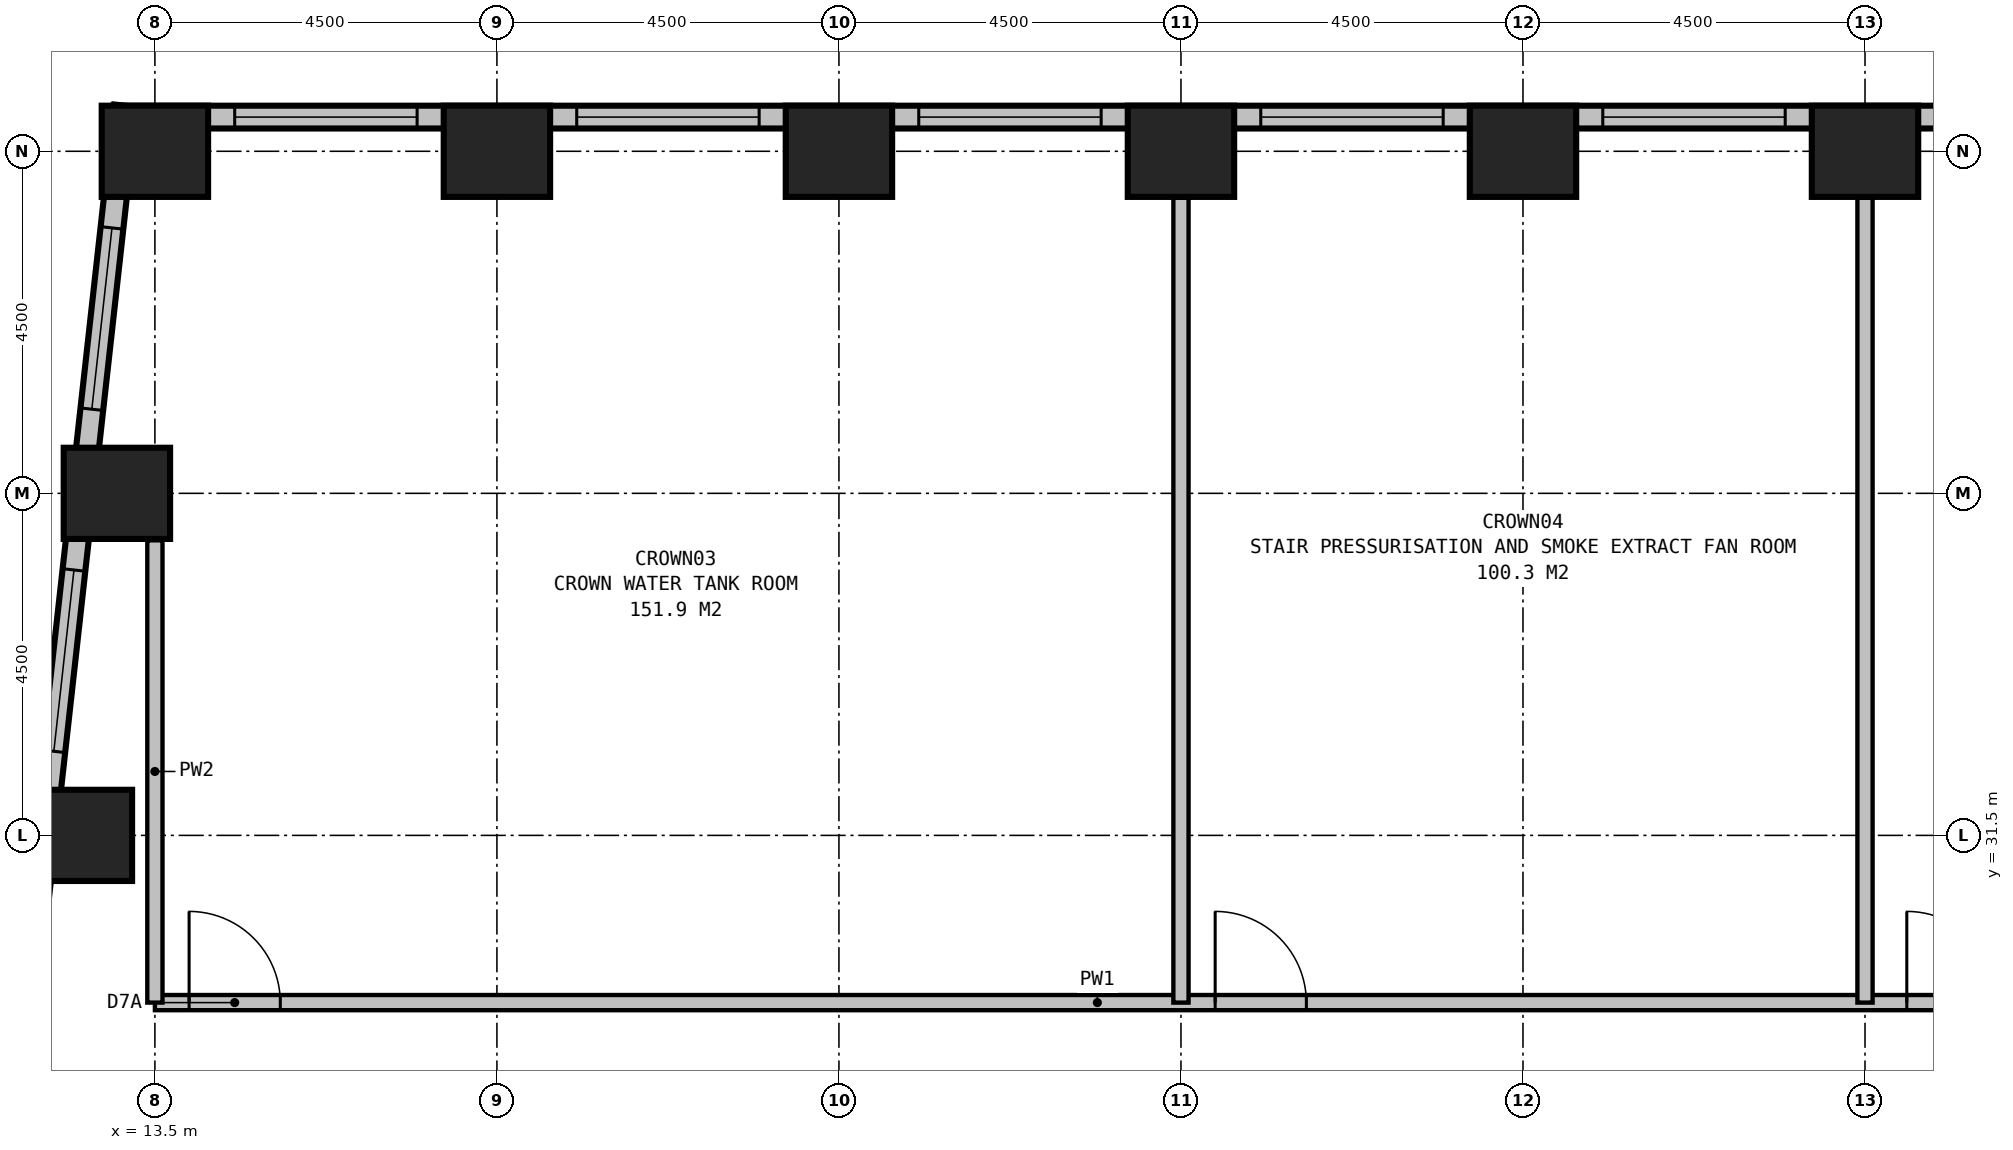
"""IFC4 building model, lengths in metres.
Left out: names, types, materials, properties, quantities, classifications, styles, units other than length and angle.
Written with IfcOpenShell. Run it as: python <this file> out.ifc"""

import sys

from ifc_helpers import new_model, si_unit, direction, frame, frame_2d, origin, origin_2d, place, context, subcontext, project, spatial, polyline, rectangle, outline, extrude, clip, halfspace, element, fill, save


model = new_model("IFC4")
c1 = context("Model", 3, precision=1e-05, world=origin(), true_north=direction((0.0, 1.0)))
c2 = subcontext(c1, "Body", "Model", "MODEL_VIEW")
j1 = project(units=[si_unit("LENGTHUNIT", "METRE"), si_unit("PLANEANGLEUNIT", "RADIAN")], contexts=[c1])
p1 = place(None, origin())
s1 = spatial("IfcSite", under=j1, at=p1, CompositionType="ELEMENT")
p2 = place(p1, origin())
s2 = spatial("IfcBuilding", under=s1, at=p2, CompositionType="ELEMENT")
p3 = place(p2, frame((0.0, 0.0, 289.7)))
s3 = spatial("IfcBuildingStorey", under=s2, at=p3, CompositionType="ELEMENT", Elevation=289.7)
p4 = place(p3, frame((36.0, 40.5, 0.0), z_axis=(0.0, 0.0, 1.0), x_axis=(1.0, 0.0, 0.0)))
e1 = element("IfcColumn", 1, at=p4, inside=s3, PredefinedType="COLUMN", context=c2, shape_type="Clipping", body=[
    clip(extrude(rectangle(XDim=1.4, YDim=1.2, at=origin_2d()), origin(), (0.0, 0.0, 1.0), 20.243), halfspace(frame((0.0, 0.0, 20.291), z_axis=(-0.294483896091, -0.25767390908, 0.920262675285), x_axis=(0.952424195267, 0.0, 0.304775576894)), False)),
])
p5 = place(p3, frame((31.5, 40.5, 0.0), z_axis=(0.0, 0.0, 1.0), x_axis=(1.0, 0.0, 0.0)))
e2 = element("IfcColumn", 2, at=p5, inside=s3, PredefinedType="COLUMN", context=c2, shape_type="Clipping", body=[
    clip(extrude(rectangle(XDim=1.4, YDim=1.2, at=origin_2d()), origin(), (0.0, 0.0, 1.0), 18.803), halfspace(frame((0.0, 0.0, 18.851), z_axis=(-0.294483896091, -0.25767390908, 0.920262675285), x_axis=(0.952424195267, 0.0, 0.304775576894)), False)),
])
p6 = place(p3, frame((27.0, 40.5, 0.0), z_axis=(0.0, 0.0, 1.0), x_axis=(1.0, 0.0, 0.0)))
e3 = element("IfcColumn", 3, at=p6, inside=s3, PredefinedType="COLUMN", context=c2, shape_type="Clipping", body=[
    clip(extrude(rectangle(XDim=1.4, YDim=1.2, at=origin_2d()), origin(), (0.0, 0.0, 1.0), 17.363), halfspace(frame((0.0, 0.0, 17.411), z_axis=(-0.294483896091, -0.25767390908, 0.920262675285), x_axis=(0.952424195267, 0.0, 0.304775576894)), False)),
])
p7 = place(p3, frame((22.5, 40.5, 0.0), z_axis=(0.0, 0.0, 1.0), x_axis=(1.0, 0.0, 0.0)))
e4 = element("IfcColumn", 4, at=p7, inside=s3, PredefinedType="COLUMN", context=c2, shape_type="Clipping", body=[
    clip(extrude(rectangle(XDim=1.4, YDim=1.2, at=origin_2d()), origin(), (0.0, 0.0, 1.0), 15.923), halfspace(frame((0.0, 0.0, 15.971), z_axis=(-0.294483896091, -0.25767390908, 0.920262675285), x_axis=(0.952424195267, 0.0, 0.304775576894)), False)),
])
p8 = place(p3, frame((18.0, 40.5, 0.0), z_axis=(0.0, 0.0, 1.0), x_axis=(1.0, 0.0, 0.0)))
e5 = element("IfcColumn", 5, at=p8, inside=s3, PredefinedType="COLUMN", context=c2, shape_type="Clipping", body=[
    clip(extrude(rectangle(XDim=1.4, YDim=1.2, at=origin_2d()), origin(), (0.0, 0.0, 1.0), 14.483), halfspace(frame((0.0, 0.0, 14.531), z_axis=(-0.294483896091, -0.25767390908, 0.920262675285), x_axis=(0.952424195267, 0.0, 0.304775576894)), False)),
])
p9 = place(p3, frame((13.5, 40.5, 0.0), z_axis=(0.0, 0.0, 1.0), x_axis=(1.0, 0.0, 0.0)))
e6 = element("IfcColumn", 6, at=p9, inside=s3, PredefinedType="COLUMN", context=c2, shape_type="Clipping", body=[
    clip(extrude(rectangle(XDim=1.4, YDim=1.2, at=origin_2d()), origin(), (0.0, 0.0, 1.0), 13.043), halfspace(frame((0.0, 0.0, 13.091), z_axis=(-0.294483896091, -0.25767390908, 0.920262675285), x_axis=(0.952424195267, 0.0, 0.304775576894)), False)),
])
p10 = place(p3, frame((13.0, 36.0, 0.0), z_axis=(0.0, 0.0, 1.0), x_axis=(1.0, 0.0, 0.0)))
e7 = element("IfcColumn", 7, at=p10, inside=s3, PredefinedType="COLUMN", context=c2, shape_type="Clipping", body=[
    clip(extrude(rectangle(XDim=1.4, YDim=1.2, at=origin_2d()), origin(), (0.0, 0.0, 1.0), 11.623), halfspace(frame((0.0, 0.0, 11.671), z_axis=(-0.294483896091, -0.25767390908, 0.920262675285), x_axis=(0.952424195267, 0.0, 0.304775576894)), False)),
])
p11 = place(p3, frame((12.5, 31.5, 0.0), z_axis=(0.0, 0.0, 1.0), x_axis=(1.0, 0.0, 0.0)))
e8 = element("IfcColumn", 8, at=p11, inside=s3, PredefinedType="COLUMN", context=c2, shape_type="Clipping", body=[
    clip(extrude(rectangle(XDim=1.4, YDim=1.2, at=origin_2d()), origin(), (0.0, 0.0, 1.0), 10.203), halfspace(frame((0.0, 0.0, 10.251), z_axis=(-0.294483896091, -0.25767390908, 0.920262675285), x_axis=(0.952424195267, 0.0, 0.304775576894)), False)),
])
p12 = place(p3, frame((41.1, 40.95, -0.3), z_axis=(0.0, 0.0, 1.0), x_axis=(-1.0, 0.0, 0.0)))
e9 = element("IfcWall", 9, at=p12, inside=s3, PredefinedType="STANDARD", context=c2, shape_type="Clipping", body=[
    clip(extrude(outline(polyline([(0.0, 0.0), (28.153, 0.0), (28.153, 13.34), (0.0, 22.349), (0.0, 0.0)])), frame((0.0, 0.15, 0.0), z_axis=(0.0, -1.0, 0.0), x_axis=(1.0, 0.0, 0.0)), (0.0, 0.0, 1.0), 0.3), halfspace(frame((0.0, 0.0, 22.349), z_axis=(0.294483896091, 0.25767390908, 0.920262675285), x_axis=(0.952424195267, 0.0, -0.304775576894)), False)),
])
p13 = place(p12, frame((1.65, 0.0, 0.8)))
e10 = element("IfcOpeningElement", 10, at=p13, cuts=e9, PredefinedType="OPENING", context=c2, shape_type="SweptSolid", body=[
    extrude(rectangle(XDim=2.4, YDim=1.8, at=frame_2d((1.2, 0.9))), frame((0.0, 0.16, 0.0), z_axis=(0.0, -1.0, 0.0), x_axis=(1.0, 0.0, 0.0)), (0.0, 0.0, 1.0), 0.32),
])
p14 = place(p12, frame((6.15, 0.0, 0.8)))
e11 = element("IfcOpeningElement", 11, at=p14, cuts=e9, PredefinedType="OPENING", context=c2, shape_type="SweptSolid", body=[
    extrude(rectangle(XDim=2.4, YDim=1.8, at=frame_2d((1.2, 0.9))), frame((0.0, 0.16, 0.0), z_axis=(0.0, -1.0, 0.0), x_axis=(1.0, 0.0, 0.0)), (0.0, 0.0, 1.0), 0.32),
])
p15 = place(p12, frame((10.65, 0.0, 0.8)))
e12 = element("IfcOpeningElement", 12, at=p15, cuts=e9, PredefinedType="OPENING", context=c2, shape_type="SweptSolid", body=[
    extrude(rectangle(XDim=2.4, YDim=1.8, at=frame_2d((1.2, 0.9))), frame((0.0, 0.16, 0.0), z_axis=(0.0, -1.0, 0.0), x_axis=(1.0, 0.0, 0.0)), (0.0, 0.0, 1.0), 0.32),
])
p16 = place(p12, frame((15.15, 0.0, 0.8)))
e13 = element("IfcOpeningElement", 13, at=p16, cuts=e9, PredefinedType="OPENING", context=c2, shape_type="SweptSolid", body=[
    extrude(rectangle(XDim=2.4, YDim=1.8, at=frame_2d((1.2, 0.9))), frame((0.0, 0.16, 0.0), z_axis=(0.0, -1.0, 0.0), x_axis=(1.0, 0.0, 0.0)), (0.0, 0.0, 1.0), 0.32),
])
p17 = place(p12, frame((19.65, 0.0, 0.8)))
e14 = element("IfcOpeningElement", 14, at=p17, cuts=e9, PredefinedType="OPENING", context=c2, shape_type="SweptSolid", body=[
    extrude(rectangle(XDim=2.4, YDim=1.8, at=frame_2d((1.2, 0.9))), frame((0.0, 0.16, 0.0), z_axis=(0.0, -1.0, 0.0), x_axis=(1.0, 0.0, 0.0)), (0.0, 0.0, 1.0), 0.32),
])
p18 = place(p12, frame((24.15, 0.0, 0.8)))
e15 = element("IfcOpeningElement", 15, at=p18, cuts=e9, PredefinedType="OPENING", context=c2, shape_type="SweptSolid", body=[
    extrude(rectangle(XDim=2.4, YDim=1.8, at=frame_2d((1.2, 0.9))), frame((0.0, 0.16, 0.0), z_axis=(0.0, -1.0, 0.0), x_axis=(1.0, 0.0, 0.0)), (0.0, 0.0, 1.0), 0.32),
])
p19 = place(p3, frame((13.114, 41.099, -0.3), z_axis=(0.0, 0.0, 1.0), x_axis=(-0.110429082637, -0.993884006164, 0.0)))
e16 = element("IfcWall", 16, at=p19, inside=s3, PredefinedType="STANDARD", context=c2, shape_type="Clipping", body=[
    clip(extrude(outline(polyline([(0.0, 0.0), (32.899, 0.0), (32.899, 3.117), (0.0, 13.435), (0.0, 0.0)])), frame((0.0, 0.15, 0.0), z_axis=(0.0, -1.0, 0.0), x_axis=(1.0, 0.0, 0.0)), (0.0, 0.0, 1.0), 0.3), halfspace(frame((0.0, 0.0, 13.435), z_axis=(0.288617563537, -0.264228140999, 0.920262675285), x_axis=(0.954173815871, 0.0, -0.299252951709)), False)),
])
p20 = place(p19, frame((1.617, 0.0, 0.8)))
e17 = element("IfcOpeningElement", 17, at=p20, cuts=e16, PredefinedType="OPENING", context=c2, shape_type="SweptSolid", body=[
    extrude(rectangle(XDim=2.4, YDim=1.8, at=frame_2d((1.2, 0.9))), frame((0.0, 0.16, 0.0), z_axis=(0.0, -1.0, 0.0), x_axis=(1.0, 0.0, 0.0)), (0.0, 0.0, 1.0), 0.32),
])
p21 = place(p19, frame((6.145, 0.0, 0.8)))
e18 = element("IfcOpeningElement", 18, at=p21, cuts=e16, PredefinedType="OPENING", context=c2, shape_type="SweptSolid", body=[
    extrude(rectangle(XDim=2.4, YDim=1.8, at=frame_2d((1.2, 0.9))), frame((0.0, 0.16, 0.0), z_axis=(0.0, -1.0, 0.0), x_axis=(1.0, 0.0, 0.0)), (0.0, 0.0, 1.0), 0.32),
])
p22 = place(p19, frame((10.672, 0.0, 0.8)))
e19 = element("IfcOpeningElement", 19, at=p22, cuts=e16, PredefinedType="OPENING", context=c2, shape_type="SweptSolid", body=[
    extrude(rectangle(XDim=2.4, YDim=1.8, at=frame_2d((1.2, 0.9))), frame((0.0, 0.16, 0.0), z_axis=(0.0, -1.0, 0.0), x_axis=(1.0, 0.0, 0.0)), (0.0, 0.0, 1.0), 0.32),
])
p23 = place(p19, frame((15.2, 0.0, 0.8)))
e20 = element("IfcOpeningElement", 20, at=p23, cuts=e16, PredefinedType="OPENING", context=c2, shape_type="SweptSolid", body=[
    extrude(rectangle(XDim=2.4, YDim=1.8, at=frame_2d((1.2, 0.9))), frame((0.0, 0.16, 0.0), z_axis=(0.0, -1.0, 0.0), x_axis=(1.0, 0.0, 0.0)), (0.0, 0.0, 1.0), 0.32),
])
p24 = place(p19, frame((19.728, 0.0, 0.8)))
e21 = element("IfcOpeningElement", 21, at=p24, cuts=e16, PredefinedType="OPENING", context=c2, shape_type="SweptSolid", body=[
    extrude(rectangle(XDim=2.4, YDim=1.8, at=frame_2d((1.2, 0.9))), frame((0.0, 0.16, 0.0), z_axis=(0.0, -1.0, 0.0), x_axis=(1.0, 0.0, 0.0)), (0.0, 0.0, 1.0), 0.32),
])
p25 = place(p19, frame((24.255, 0.0, 0.8)))
e22 = element("IfcOpeningElement", 22, at=p25, cuts=e16, PredefinedType="OPENING", context=c2, shape_type="SweptSolid", body=[
    extrude(rectangle(XDim=2.4, YDim=1.8, at=frame_2d((1.2, 0.9))), frame((0.0, 0.16, 0.0), z_axis=(0.0, -1.0, 0.0), x_axis=(1.0, 0.0, 0.0)), (0.0, 0.0, 1.0), 0.32),
])
p26 = place(p19, frame((28.783, 0.0, 0.8)))
e23 = element("IfcOpeningElement", 23, at=p26, cuts=e16, PredefinedType="OPENING", context=c2, shape_type="SweptSolid", body=[
    extrude(rectangle(XDim=2.4, YDim=1.8, at=frame_2d((1.2, 0.9))), frame((0.0, 0.16, 0.0), z_axis=(0.0, -1.0, 0.0), x_axis=(1.0, 0.0, 0.0)), (0.0, 0.0, 1.0), 0.32),
])
p27 = place(p3, frame((13.5, 29.3, 0.0), z_axis=(0.0, 0.0, 1.0), x_axis=(1.0, 0.0, 0.0)))
e24 = element("IfcWall", 24, at=p27, inside=s3, PredefinedType="PARTITIONING", context=c2, shape_type="SweptSolid", body=[
    extrude(rectangle(XDim=24.8, YDim=0.2, at=frame_2d((12.4, 0.0))), origin(), (0.0, 0.0, 1.0), 4.0),
])
p28 = place(p27, frame((0.45, 0.0, 0.0)))
e25 = element("IfcOpeningElement", 25, at=p28, cuts=e24, PredefinedType="OPENING", context=c2, shape_type="SweptSolid", body=[
    extrude(rectangle(XDim=1.2, YDim=2.1, at=frame_2d((0.6, 1.05))), frame((0.0, 0.11, 0.0), z_axis=(0.0, -1.0, 0.0), x_axis=(1.0, 0.0, 0.0)), (0.0, 0.0, 1.0), 0.22),
])
p29 = place(p27, frame((13.95, 0.0, 0.0)))
e26 = element("IfcOpeningElement", 26, at=p29, cuts=e24, PredefinedType="OPENING", context=c2, shape_type="SweptSolid", body=[
    extrude(rectangle(XDim=1.2, YDim=2.1, at=frame_2d((0.6, 1.05))), frame((0.0, 0.11, 0.0), z_axis=(0.0, -1.0, 0.0), x_axis=(1.0, 0.0, 0.0)), (0.0, 0.0, 1.0), 0.22),
])
p30 = place(p27, frame((23.05, 0.0, 0.0)))
e27 = element("IfcOpeningElement", 27, at=p30, cuts=e24, PredefinedType="OPENING", context=c2, shape_type="SweptSolid", body=[
    extrude(rectangle(XDim=1.2, YDim=2.1, at=frame_2d((0.6, 1.05))), frame((0.0, 0.11, 0.0), z_axis=(0.0, -1.0, 0.0), x_axis=(1.0, 0.0, 0.0)), (0.0, 0.0, 1.0), 0.22),
])
p31 = place(p3, frame((13.5, 29.3, 0.0), z_axis=(0.0, 0.0, 1.0), x_axis=(0.0, 1.0, 0.0)))
e28 = element("IfcWall", 28, at=p31, inside=s3, PredefinedType="PARTITIONING", context=c2, shape_type="SweptSolid", body=[
    extrude(rectangle(XDim=6.082, YDim=0.2, at=frame_2d((3.041, 0.0))), origin(), (0.0, 0.0, 1.0), 4.0),
])
for number, where, z_axis, x_axis in (
    (29, (27.0, 29.3, 0.0), (0.0, 0.0, 1.0), (0.0, 1.0, 0.0)),
    (30, (36.0, 29.3, 0.0), (0.0, 0.0, 1.0), (0.0, 1.0, 0.0)),
):
    element("IfcWall", number, at=place(p3, frame(where, z_axis=z_axis, x_axis=x_axis)), inside=s3, PredefinedType="PARTITIONING", context=c2, shape_type="SweptSolid", body=[
        extrude(rectangle(XDim=10.59, YDim=0.2, at=frame_2d((5.295, 0.0))), origin(), (0.0, 0.0, 1.0), 4.0),
    ])
p32 = place(p14, origin())
e31 = element("IfcWindow", 31, at=p32, inside=s3, PartitioningType="SINGLE_PANEL", PredefinedType="USERDEFINED", context=c2, shape_type="SweptSolid", body=[
    extrude(rectangle(XDim=2.4, YDim=1.8, at=frame_2d((1.2, 0.9))), frame((0.0, 0.03, 0.0), z_axis=(0.0, -1.0, 0.0), x_axis=(1.0, 0.0, 0.0)), (0.0, 0.0, 1.0), 0.06),
])
fill(e11, e31)
p33 = place(p15, origin())
e32 = element("IfcWindow", 32, at=p33, inside=s3, PartitioningType="SINGLE_PANEL", PredefinedType="USERDEFINED", context=c2, shape_type="SweptSolid", body=[
    extrude(rectangle(XDim=2.4, YDim=1.8, at=frame_2d((1.2, 0.9))), frame((0.0, 0.03, 0.0), z_axis=(0.0, -1.0, 0.0), x_axis=(1.0, 0.0, 0.0)), (0.0, 0.0, 1.0), 0.06),
])
fill(e12, e32)
p34 = place(p16, origin())
e33 = element("IfcWindow", 33, at=p34, inside=s3, PartitioningType="SINGLE_PANEL", PredefinedType="USERDEFINED", context=c2, shape_type="SweptSolid", body=[
    extrude(rectangle(XDim=2.4, YDim=1.8, at=frame_2d((1.2, 0.9))), frame((0.0, 0.03, 0.0), z_axis=(0.0, -1.0, 0.0), x_axis=(1.0, 0.0, 0.0)), (0.0, 0.0, 1.0), 0.06),
])
fill(e13, e33)
p35 = place(p17, origin())
e34 = element("IfcWindow", 34, at=p35, inside=s3, PartitioningType="SINGLE_PANEL", PredefinedType="USERDEFINED", context=c2, shape_type="SweptSolid", body=[
    extrude(rectangle(XDim=2.4, YDim=1.8, at=frame_2d((1.2, 0.9))), frame((0.0, 0.03, 0.0), z_axis=(0.0, -1.0, 0.0), x_axis=(1.0, 0.0, 0.0)), (0.0, 0.0, 1.0), 0.06),
])
fill(e14, e34)
p36 = place(p18, origin())
e35 = element("IfcWindow", 35, at=p36, inside=s3, PartitioningType="SINGLE_PANEL", PredefinedType="USERDEFINED", context=c2, shape_type="SweptSolid", body=[
    extrude(rectangle(XDim=2.4, YDim=1.8, at=frame_2d((1.2, 0.9))), frame((0.0, 0.03, 0.0), z_axis=(0.0, -1.0, 0.0), x_axis=(1.0, 0.0, 0.0)), (0.0, 0.0, 1.0), 0.06),
])
fill(e15, e35)
p37 = place(p20, origin())
e36 = element("IfcWindow", 36, at=p37, inside=s3, PartitioningType="SINGLE_PANEL", PredefinedType="USERDEFINED", context=c2, shape_type="SweptSolid", body=[
    extrude(rectangle(XDim=2.4, YDim=1.8, at=frame_2d((1.2, 0.9))), frame((0.0, 0.03, 0.0), z_axis=(0.0, -1.0, 0.0), x_axis=(1.0, 0.0, 0.0)), (0.0, 0.0, 1.0), 0.06),
])
fill(e17, e36)
p38 = place(p21, origin())
e37 = element("IfcWindow", 37, at=p38, inside=s3, PartitioningType="SINGLE_PANEL", PredefinedType="USERDEFINED", context=c2, shape_type="SweptSolid", body=[
    extrude(rectangle(XDim=2.4, YDim=1.8, at=frame_2d((1.2, 0.9))), frame((0.0, 0.03, 0.0), z_axis=(0.0, -1.0, 0.0), x_axis=(1.0, 0.0, 0.0)), (0.0, 0.0, 1.0), 0.06),
])
fill(e18, e37)
p39 = place(p28, origin())
e38 = element("IfcDoor", 38, at=p39, inside=s3, OperationType="SINGLE_SWING_LEFT", PredefinedType="DOOR", context=c2, shape_type="SweptSolid", body=[
    extrude(rectangle(XDim=1.2, YDim=2.1, at=frame_2d((0.6, 1.05))), frame((0.0, 0.025, 0.0), z_axis=(0.0, -1.0, 0.0), x_axis=(1.0, 0.0, 0.0)), (0.0, 0.0, 1.0), 0.05),
])
fill(e25, e38)
p40 = place(p29, origin())
e39 = element("IfcDoor", 39, at=p40, inside=s3, OperationType="SINGLE_SWING_LEFT", PredefinedType="DOOR", context=c2, shape_type="SweptSolid", body=[
    extrude(rectangle(XDim=1.2, YDim=2.1, at=frame_2d((0.6, 1.05))), frame((0.0, 0.025, 0.0), z_axis=(0.0, -1.0, 0.0), x_axis=(1.0, 0.0, 0.0)), (0.0, 0.0, 1.0), 0.05),
])
fill(e26, e39)
p41 = place(p30, origin())
e40 = element("IfcDoor", 40, at=p41, inside=s3, OperationType="SINGLE_SWING_LEFT", PredefinedType="DOOR", context=c2, shape_type="SweptSolid", body=[
    extrude(rectangle(XDim=1.2, YDim=2.1, at=frame_2d((0.6, 1.05))), frame((0.0, 0.025, 0.0), z_axis=(0.0, -1.0, 0.0), x_axis=(1.0, 0.0, 0.0)), (0.0, 0.0, 1.0), 0.05),
])
fill(e27, e40)
save(model, sys.argv[1])
